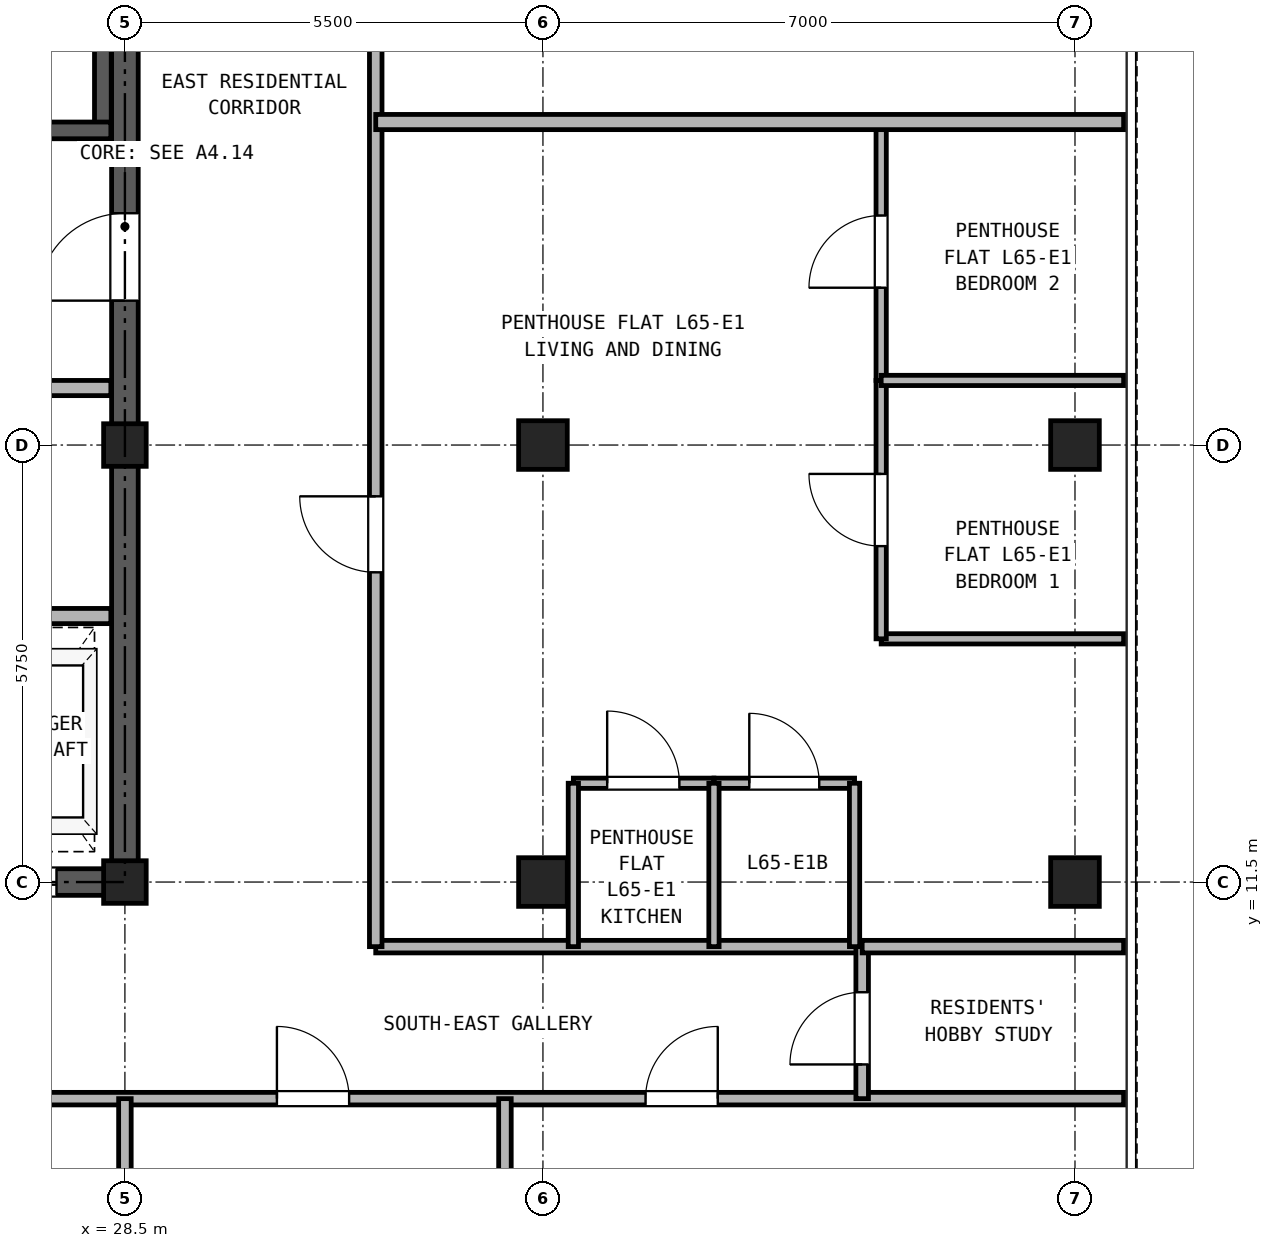
"""IFC4 building model, lengths in metres.
Left out: names, types, materials, properties, quantities, classifications, styles, units other than length and angle.
Written with IfcOpenShell. Run it as: python <this file> out.ifc"""

import sys

from ifc_helpers import new_model, si_unit, direction, frame, frame_2d, origin, origin_2d, place, context, subcontext, project, spatial, rectangle, hollow_rectangle, extrude, source, transform, mapped, element, fill, save


model = new_model("IFC4")
c1 = context("Model", 3, precision=1e-05, world=origin(), true_north=direction((0.0, 1.0)))
c2 = subcontext(c1, "Body", "Model", "MODEL_VIEW")
j1 = project(units=[si_unit("LENGTHUNIT", "METRE"), si_unit("PLANEANGLEUNIT", "RADIAN")], contexts=[c1])
p1 = place(None, origin())
s1 = spatial("IfcSite", under=j1, at=p1, CompositionType="ELEMENT")
p2 = place(p1, origin())
s2 = spatial("IfcBuilding", under=s1, at=p2, CompositionType="ELEMENT")
p3 = place(p2, frame((0.0, 0.0, 229.7)))
s3 = spatial("IfcBuildingStorey", under=s2, at=p3, CompositionType="ELEMENT", Elevation=229.7)
m1 = source(origin(), c2, "Body", "SweptSolid", [
    extrude(hollow_rectangle(XDim=0.64, YDim=0.64, WallThickness=0.035, at=origin_2d()), origin(), (0.0, 0.0, 1.0), 2.98),
])
for number, where, z_axis, x_axis in (
    (1, (41.0, 11.5, 0.0), (0.0, 0.0, 1.0), (1.0, 0.0, 0.0)),
    (2, (41.0, 17.25, 0.0), (0.0, 0.0, 1.0), (1.0, 0.0, 0.0)),
):
    element("IfcColumn", number, at=place(p3, frame(where, z_axis=z_axis, x_axis=x_axis)), inside=s3, PredefinedType="COLUMN", context=c2, shape_type="MappedRepresentation", body=[
        mapped(m1, transform((0.0, 0.0, 0.0), x_axis=(1.0, 0.0, 0.0), y_axis=(0.0, 1.0, 0.0), z_axis=(0.0, 0.0, 1.0), scale=1.0)),
    ])
m2 = source(origin(), c2, "Body", "SweptSolid", [
    extrude(hollow_rectangle(XDim=0.56, YDim=0.56, WallThickness=0.03, at=origin_2d()), origin(), (0.0, 0.0, 1.0), 2.98),
])
for number, where, z_axis, x_axis in (
    (3, (28.5, 11.5, 0.0), (0.0, 0.0, 1.0), (1.0, 0.0, 0.0)),
    (4, (28.5, 17.25, 0.0), (0.0, 0.0, 1.0), (1.0, 0.0, 0.0)),
):
    element("IfcColumn", number, at=place(p3, frame(where, z_axis=z_axis, x_axis=x_axis)), inside=s3, PredefinedType="COLUMN", context=c2, shape_type="MappedRepresentation", body=[
        mapped(m2, transform((0.0, 0.0, 0.0), x_axis=(1.0, 0.0, 0.0), y_axis=(0.0, 1.0, 0.0), z_axis=(0.0, 0.0, 1.0), scale=1.0)),
    ])
for number, where, z_axis, x_axis in (
    (5, (34.0, 11.5, 0.0), (0.0, 0.0, 1.0), (1.0, 0.0, 0.0)),
    (6, (34.0, 17.25, 0.0), (0.0, 0.0, 1.0), (1.0, 0.0, 0.0)),
):
    element("IfcColumn", number, at=place(p3, frame(where, z_axis=z_axis, x_axis=x_axis)), inside=s3, PredefinedType="COLUMN", context=c2, shape_type="MappedRepresentation", body=[
        mapped(m1, transform((0.0, 0.0, 0.0), x_axis=(1.0, 0.0, 0.0), y_axis=(0.0, 1.0, 0.0), z_axis=(0.0, 0.0, 1.0), scale=1.0)),
    ])
p4 = place(p3, frame((18.325, 11.5, 0.0), z_axis=(0.0, 0.0, 1.0), x_axis=(1.0, 0.0, 0.0)))
e7 = element("IfcWall", 7, at=p4, inside=s3, PredefinedType="SHEAR", context=c2, shape_type="SweptSolid", body=[
    extrude(rectangle(XDim=10.35, YDim=0.35, at=frame_2d((5.175, 0.0))), origin(), (0.0, 0.0, 1.0), 2.98),
])
p5 = place(p4, frame((1.775, 0.0, 0.0)))
e8 = element("IfcOpeningElement", 8, at=p5, cuts=e7, PredefinedType="OPENING", context=c2, shape_type="SweptSolid", body=[
    extrude(rectangle(XDim=0.95, YDim=2.15, at=frame_2d((0.475, 1.075))), frame((0.0, 0.185, 0.0), z_axis=(0.0, -1.0, 0.0), x_axis=(1.0, 0.0, 0.0)), (0.0, 0.0, 1.0), 0.37),
])
p6 = place(p4, frame((5.275, 0.0, 0.0)))
e9 = element("IfcOpeningElement", 9, at=p6, cuts=e7, PredefinedType="OPENING", context=c2, shape_type="SweptSolid", body=[
    extrude(rectangle(XDim=0.95, YDim=2.15, at=frame_2d((0.475, 1.075))), frame((0.0, 0.185, 0.0), z_axis=(0.0, -1.0, 0.0), x_axis=(1.0, 0.0, 0.0)), (0.0, 0.0, 1.0), 0.37),
])
p7 = place(p4, frame((8.175, 0.0, 0.0)))
e10 = element("IfcOpeningElement", 10, at=p7, cuts=e7, PredefinedType="OPENING", context=c2, shape_type="SweptSolid", body=[
    extrude(rectangle(XDim=1.1, YDim=2.25, at=frame_2d((0.55, 1.125))), frame((0.0, 0.185, 0.0), z_axis=(0.0, -1.0, 0.0), x_axis=(1.0, 0.0, 0.0)), (0.0, 0.0, 1.0), 0.37),
])
p8 = place(p3, frame((28.5, 11.675, 0.0), z_axis=(0.0, 0.0, 1.0), x_axis=(0.0, 1.0, 0.0)))
e11 = element("IfcWall", 11, at=p8, inside=s3, PredefinedType="SHEAR", context=c2, shape_type="SweptSolid", body=[
    extrude(rectangle(XDim=16.9, YDim=0.35, at=frame_2d((8.45, 0.0))), origin(), (0.0, 0.0, 1.0), 2.98),
])
p9 = place(p8, frame((7.475, 0.0, 0.0)))
e12 = element("IfcOpeningElement", 12, at=p9, cuts=e11, PredefinedType="OPENING", context=c2, shape_type="SweptSolid", body=[
    extrude(rectangle(XDim=1.15, YDim=2.2, at=frame_2d((0.575, 1.1))), frame((0.0, 0.185, 0.0), z_axis=(0.0, -1.0, 0.0), x_axis=(1.0, 0.0, 0.0)), (0.0, 0.0, 1.0), 0.37),
])
p10 = place(p3, frame((28.21, 21.39, 0.0), z_axis=(0.0, 0.0, 1.0), x_axis=(0.0, 1.0, 0.0)))
e13 = element("IfcWall", 13, at=p10, inside=s3, PredefinedType="SOLIDWALL", context=c2, shape_type="SweptSolid", body=[
    extrude(rectangle(XDim=6.945, YDim=0.22, at=frame_2d((3.473, 0.0))), origin(), (0.0, 0.0, 1.0), 2.98),
])
p11 = place(p3, frame((25.13, 21.39, 0.0), z_axis=(0.0, 0.0, 1.0), x_axis=(1.0, 0.0, 0.0)))
e14 = element("IfcWall", 14, at=p11, inside=s3, PredefinedType="SOLIDWALL", context=c2, shape_type="SweptSolid", body=[
    extrude(rectangle(XDim=3.185, YDim=0.22, at=frame_2d((1.593, 0.0))), origin(), (0.0, 0.0, 1.0), 2.98),
])
p12 = place(p11, frame((0.92, 0.0, 0.0)))
e15 = element("IfcOpeningElement", 15, at=p12, cuts=e14, PredefinedType="OPENING", context=c2, shape_type="SweptSolid", body=[
    extrude(rectangle(XDim=1.15, YDim=2.2, at=frame_2d((0.575, 1.1))), frame((0.0, 0.12, 0.0), z_axis=(0.0, -1.0, 0.0), x_axis=(1.0, 0.0, 0.0)), (0.0, 0.0, 1.0), 0.24),
])
p13 = place(p3, frame((18.685, 18.0, 0.0), z_axis=(0.0, 0.0, 1.0), x_axis=(1.0, 0.0, 0.0)))
e16 = element("IfcWall", 16, at=p13, inside=s3, PredefinedType="PARTITIONING", context=c2, shape_type="SweptSolid", body=[
    extrude(rectangle(XDim=9.63, YDim=0.2, at=frame_2d((4.815, 0.0))), origin(), (0.0, 0.0, 1.0), 2.98),
])
p14 = place(p13, frame((0.565, 0.0, 0.0)))
e17 = element("IfcOpeningElement", 17, at=p14, cuts=e16, PredefinedType="OPENING", context=c2, shape_type="SweptSolid", body=[
    extrude(rectangle(XDim=1.3, YDim=2.3, at=frame_2d((0.65, 1.15))), frame((0.0, 0.11, 0.0), z_axis=(0.0, -1.0, 0.0), x_axis=(1.0, 0.0, 0.0)), (0.0, 0.0, 1.0), 0.22),
])
p15 = place(p13, frame((2.665, 0.0, 0.0)))
e18 = element("IfcOpeningElement", 18, at=p15, cuts=e16, PredefinedType="OPENING", context=c2, shape_type="SweptSolid", body=[
    extrude(rectangle(XDim=1.3, YDim=2.3, at=frame_2d((0.65, 1.15))), frame((0.0, 0.11, 0.0), z_axis=(0.0, -1.0, 0.0), x_axis=(1.0, 0.0, 0.0)), (0.0, 0.0, 1.0), 0.22),
])
p16 = place(p13, frame((7.165, 0.0, 0.0)))
e19 = element("IfcOpeningElement", 19, at=p16, cuts=e16, PredefinedType="OPENING", context=c2, shape_type="SweptSolid", body=[
    extrude(rectangle(XDim=1.0, YDim=2.15, at=frame_2d((0.5, 1.075))), frame((0.0, 0.11, 0.0), z_axis=(0.0, -1.0, 0.0), x_axis=(1.0, 0.0, 0.0)), (0.0, 0.0, 1.0), 0.22),
])
p17 = place(p3, frame((18.685, 15.0, 0.0), z_axis=(0.0, 0.0, 1.0), x_axis=(1.0, 0.0, 0.0)))
e20 = element("IfcWall", 20, at=p17, inside=s3, PredefinedType="PARTITIONING", context=c2, shape_type="SweptSolid", body=[
    extrude(rectangle(XDim=9.63, YDim=0.2, at=frame_2d((4.815, 0.0))), origin(), (0.0, 0.0, 1.0), 2.98),
])
p18 = place(p3, frame((5.36, 8.65, 0.0), z_axis=(0.0, 0.0, 1.0), x_axis=(1.0, 0.0, 0.0)))
e21 = element("IfcWall", 21, at=p18, inside=s3, PredefinedType="PARTITIONING", context=c2, shape_type="SweptSolid", body=[
    extrude(rectangle(XDim=36.28, YDim=0.165, at=frame_2d((18.14, 0.0))), origin(), (0.0, 0.0, 1.0), 2.655),
])
p19 = place(p18, frame((8.17, 0.0, 0.0)))
e22 = element("IfcOpeningElement", 22, at=p19, cuts=e21, PredefinedType="OPENING", context=c2, shape_type="SweptSolid", body=[
    extrude(rectangle(XDim=0.95, YDim=2.15, at=frame_2d((0.475, 1.075))), frame((0.0, 0.093, 0.0), z_axis=(0.0, -1.0, 0.0), x_axis=(1.0, 0.0, 0.0)), (0.0, 0.0, 1.0), 0.185),
])
p20 = place(p18, frame((18.14, 0.0, 0.0)))
e23 = element("IfcOpeningElement", 23, at=p20, cuts=e21, PredefinedType="OPENING", context=c2, shape_type="SweptSolid", body=[
    extrude(rectangle(XDim=0.95, YDim=2.15, at=frame_2d((0.475, 1.075))), frame((0.0, 0.093, 0.0), z_axis=(0.0, -1.0, 0.0), x_axis=(1.0, 0.0, 0.0)), (0.0, 0.0, 1.0), 0.185),
])
p21 = place(p18, frame((25.14, 0.0, 0.0)))
e24 = element("IfcOpeningElement", 24, at=p21, cuts=e21, PredefinedType="OPENING", context=c2, shape_type="SweptSolid", body=[
    extrude(rectangle(XDim=0.95, YDim=2.15, at=frame_2d((0.475, 1.075))), frame((0.0, 0.093, 0.0), z_axis=(0.0, -1.0, 0.0), x_axis=(1.0, 0.0, 0.0)), (0.0, 0.0, 1.0), 0.185),
])
p22 = place(p18, frame((29.99, 0.0, 0.0)))
e25 = element("IfcOpeningElement", 25, at=p22, cuts=e21, PredefinedType="OPENING", context=c2, shape_type="SweptSolid", body=[
    extrude(rectangle(XDim=0.95, YDim=2.15, at=frame_2d((0.475, 1.075))), frame((0.0, 0.093, 0.0), z_axis=(0.0, -1.0, 0.0), x_axis=(1.0, 0.0, 0.0)), (0.0, 0.0, 1.0), 0.185),
])
p23 = place(p3, frame((31.8, 10.65, 0.0), z_axis=(0.0, 0.0, 1.0), x_axis=(1.0, 0.0, 0.0)))
e26 = element("IfcWall", 26, at=p23, inside=s3, PredefinedType="PARTITIONING", context=c2, shape_type="SweptSolid", body=[
    extrude(rectangle(XDim=6.4, YDim=0.165, at=frame_2d((3.2, 0.0))), origin(), (0.0, 0.0, 1.0), 2.98),
])
p24 = place(p3, frame((38.2, 8.65, 0.0), z_axis=(0.0, 0.0, 1.0), x_axis=(0.0, 1.0, 0.0)))
e27 = element("IfcWall", 27, at=p24, inside=s3, PredefinedType="PARTITIONING", context=c2, shape_type="SweptSolid", body=[
    extrude(rectangle(XDim=2.0, YDim=0.165, at=frame_2d((1.0, 0.0))), origin(), (0.0, 0.0, 1.0), 2.98),
])
p25 = place(p24, frame((0.45, 0.0, 0.0)))
e28 = element("IfcOpeningElement", 28, at=p25, cuts=e27, PredefinedType="OPENING", context=c2, shape_type="SweptSolid", body=[
    extrude(rectangle(XDim=0.95, YDim=2.15, at=frame_2d((0.475, 1.075))), frame((0.0, 0.093, 0.0), z_axis=(0.0, -1.0, 0.0), x_axis=(1.0, 0.0, 0.0)), (0.0, 0.0, 1.0), 0.185),
])
p26 = place(p3, frame((31.8, 10.65, 0.0), z_axis=(0.0, 0.0, 1.0), x_axis=(0.0, 1.0, 0.0)))
e29 = element("IfcWall", 29, at=p26, inside=s3, PredefinedType="PARTITIONING", context=c2, shape_type="SweptSolid", body=[
    extrude(rectangle(XDim=24.49, YDim=0.165, at=frame_2d((12.245, 0.0))), origin(), (0.0, 0.0, 1.0), 2.98),
])
p27 = place(p26, frame((4.925, 0.0, 0.0)))
e30 = element("IfcOpeningElement", 30, at=p27, cuts=e29, PredefinedType="OPENING", context=c2, shape_type="SweptSolid", body=[
    extrude(rectangle(XDim=1.0, YDim=2.15, at=frame_2d((0.5, 1.075))), frame((0.0, 0.093, 0.0), z_axis=(0.0, -1.0, 0.0), x_axis=(1.0, 0.0, 0.0)), (0.0, 0.0, 1.0), 0.185),
])
p28 = place(p26, frame((15.5, 0.0, 0.0)))
e31 = element("IfcOpeningElement", 31, at=p28, cuts=e29, PredefinedType="OPENING", context=c2, shape_type="SweptSolid", body=[
    extrude(rectangle(XDim=1.0, YDim=2.15, at=frame_2d((0.5, 1.075))), frame((0.0, 0.093, 0.0), z_axis=(0.0, -1.0, 0.0), x_axis=(1.0, 0.0, 0.0)), (0.0, 0.0, 1.0), 0.185),
])
p29 = place(p3, frame((28.5, 0.16, 0.0), z_axis=(0.0, 0.0, 1.0), x_axis=(0.0, 1.0, 0.0)))
e32 = element("IfcWall", 32, at=p29, inside=s3, PredefinedType="PARTITIONING", context=c2, shape_type="SweptSolid", body=[
    extrude(rectangle(XDim=8.49, YDim=0.165, at=frame_2d((4.245, 0.0))), origin(), (0.0, 0.0, 1.0), 2.428),
])
p30 = place(p3, frame((33.5, 0.16, 0.0), z_axis=(0.0, 0.0, 1.0), x_axis=(0.0, 1.0, 0.0)))
e33 = element("IfcWall", 33, at=p30, inside=s3, PredefinedType="PARTITIONING", context=c2, shape_type="SweptSolid", body=[
    extrude(rectangle(XDim=8.49, YDim=0.165, at=frame_2d((4.245, 0.0))), origin(), (0.0, 0.0, 1.0), 2.98),
])
p31 = place(p3, frame((38.2, 10.65, 0.0), z_axis=(0.0, 0.0, 1.0), x_axis=(1.0, 0.0, 0.0)))
e34 = element("IfcWall", 34, at=p31, inside=s3, PredefinedType="PARTITIONING", context=c2, shape_type="SweptSolid", body=[
    extrude(rectangle(XDim=3.44, YDim=0.165, at=frame_2d((1.72, 0.0))), origin(), (0.0, 0.0, 1.0), 2.98),
])
p32 = place(p3, frame((34.4, 12.8, 0.0), z_axis=(0.0, 0.0, 1.0), x_axis=(1.0, 0.0, 0.0)))
e35 = element("IfcWall", 35, at=p32, inside=s3, PredefinedType="PARTITIONING", context=c2, shape_type="SweptSolid", body=[
    extrude(rectangle(XDim=1.85, YDim=0.135, at=frame_2d((0.925, 0.0))), origin(), (0.0, 0.0, 1.0), 2.98),
])
p33 = place(p32, frame((0.445, 0.0, 0.0)))
e36 = element("IfcOpeningElement", 36, at=p33, cuts=e35, PredefinedType="OPENING", context=c2, shape_type="SweptSolid", body=[
    extrude(rectangle(XDim=0.95, YDim=2.15, at=frame_2d((0.475, 1.075))), frame((0.0, 0.077, 0.0), z_axis=(0.0, -1.0, 0.0), x_axis=(1.0, 0.0, 0.0)), (0.0, 0.0, 1.0), 0.155),
])
p34 = place(p3, frame((36.25, 12.8, 0.0), z_axis=(0.0, 0.0, 1.0), x_axis=(1.0, 0.0, 0.0)))
e37 = element("IfcWall", 37, at=p34, inside=s3, PredefinedType="PARTITIONING", context=c2, shape_type="SweptSolid", body=[
    extrude(rectangle(XDim=1.85, YDim=0.135, at=frame_2d((0.925, 0.0))), origin(), (0.0, 0.0, 1.0), 2.98),
])
p35 = place(p34, frame((0.465, 0.0, 0.0)))
e38 = element("IfcOpeningElement", 38, at=p35, cuts=e37, PredefinedType="OPENING", context=c2, shape_type="SweptSolid", body=[
    extrude(rectangle(XDim=0.92, YDim=2.1, at=frame_2d((0.46, 1.05))), frame((0.0, 0.077, 0.0), z_axis=(0.0, -1.0, 0.0), x_axis=(1.0, 0.0, 0.0)), (0.0, 0.0, 1.0), 0.155),
])
for number, where, z_axis, x_axis in (
    (39, (34.4, 10.65, 0.0), (0.0, 0.0, 1.0), (0.0, 1.0, 0.0)),
    (40, (36.25, 10.65, 0.0), (0.0, 0.0, 1.0), (0.0, 1.0, 0.0)),
    (41, (38.1, 10.65, 0.0), (0.0, 0.0, 1.0), (0.0, 1.0, 0.0)),
):
    element("IfcWall", number, at=place(p3, frame(where, z_axis=z_axis, x_axis=x_axis)), inside=s3, PredefinedType="PARTITIONING", context=c2, shape_type="SweptSolid", body=[
        extrude(rectangle(XDim=2.15, YDim=0.135, at=frame_2d((1.075, 0.0))), origin(), (0.0, 0.0, 1.0), 2.98),
    ])
p36 = place(p3, frame((38.45, 14.7, 0.0), z_axis=(0.0, 0.0, 1.0), x_axis=(1.0, 0.0, 0.0)))
e42 = element("IfcWall", 42, at=p36, inside=s3, PredefinedType="PARTITIONING", context=c2, shape_type="SweptSolid", body=[
    extrude(rectangle(XDim=3.19, YDim=0.135, at=frame_2d((1.595, 0.0))), origin(), (0.0, 0.0, 1.0), 2.98),
])
p37 = place(p3, frame((38.45, 14.7, 0.0), z_axis=(0.0, 0.0, 1.0), x_axis=(0.0, 1.0, 0.0)))
e43 = element("IfcWall", 43, at=p37, inside=s3, PredefinedType="PARTITIONING", context=c2, shape_type="SweptSolid", body=[
    extrude(rectangle(XDim=3.4, YDim=0.135, at=frame_2d((1.7, 0.0))), origin(), (0.0, 0.0, 1.0), 2.98),
])
p38 = place(p37, frame((1.22, 0.0, 0.0)))
e44 = element("IfcOpeningElement", 44, at=p38, cuts=e43, PredefinedType="OPENING", context=c2, shape_type="SweptSolid", body=[
    extrude(rectangle(XDim=0.95, YDim=2.15, at=frame_2d((0.475, 1.075))), frame((0.0, 0.077, 0.0), z_axis=(0.0, -1.0, 0.0), x_axis=(1.0, 0.0, 0.0)), (0.0, 0.0, 1.0), 0.155),
])
p39 = place(p3, frame((38.45, 18.1, 0.0), z_axis=(0.0, 0.0, 1.0), x_axis=(0.0, 1.0, 0.0)))
e45 = element("IfcWall", 45, at=p39, inside=s3, PredefinedType="PARTITIONING", context=c2, shape_type="SweptSolid", body=[
    extrude(rectangle(XDim=3.4, YDim=0.135, at=frame_2d((1.7, 0.0))), origin(), (0.0, 0.0, 1.0), 2.98),
])
p40 = place(p39, frame((1.22, 0.0, 0.0)))
e46 = element("IfcOpeningElement", 46, at=p40, cuts=e45, PredefinedType="OPENING", context=c2, shape_type="SweptSolid", body=[
    extrude(rectangle(XDim=0.95, YDim=2.15, at=frame_2d((0.475, 1.075))), frame((0.0, 0.077, 0.0), z_axis=(0.0, -1.0, 0.0), x_axis=(1.0, 0.0, 0.0)), (0.0, 0.0, 1.0), 0.155),
])
p41 = place(p3, frame((38.45, 18.1, 0.0), z_axis=(0.0, 0.0, 1.0), x_axis=(1.0, 0.0, 0.0)))
e47 = element("IfcWall", 47, at=p41, inside=s3, PredefinedType="PARTITIONING", context=c2, shape_type="SweptSolid", body=[
    extrude(rectangle(XDim=3.19, YDim=0.135, at=frame_2d((1.595, 0.0))), origin(), (0.0, 0.0, 1.0), 2.98),
])
p42 = place(p3, frame((31.8, 21.5, 0.0), z_axis=(0.0, 0.0, 1.0), x_axis=(1.0, 0.0, 0.0)))
e48 = element("IfcWall", 48, at=p42, inside=s3, PredefinedType="PARTITIONING", context=c2, shape_type="SweptSolid", body=[
    extrude(rectangle(XDim=9.84, YDim=0.2, at=frame_2d((4.92, 0.0))), origin(), (0.0, 0.0, 1.0), 2.98),
])
p43 = place(p9, origin())
e49 = element("IfcDoor", 49, at=p43, inside=s3, OperationType="SINGLE_SWING_LEFT", PredefinedType="DOOR", context=c2, shape_type="SweptSolid", body=[
    extrude(rectangle(XDim=1.15, YDim=2.2, at=frame_2d((0.575, 1.1))), frame((0.0, 0.025, 0.0), z_axis=(0.0, -1.0, 0.0), x_axis=(1.0, 0.0, 0.0)), (0.0, 0.0, 1.0), 0.05),
])
fill(e12, e49)
p44 = place(p7, frame((1.1, 0.0, 0.0), z_axis=(0.0, 0.0, 1.0), x_axis=(-1.0, 0.0, 0.0)))
e50 = element("IfcDoor", 50, at=p44, inside=s3, OperationType="DOUBLE_DOOR_SLIDING", PredefinedType="DOOR", context=c2, shape_type="SweptSolid", body=[
    extrude(rectangle(XDim=1.1, YDim=2.25, at=frame_2d((0.55, 1.125))), frame((0.0, 0.025, 0.0), z_axis=(0.0, -1.0, 0.0), x_axis=(1.0, 0.0, 0.0)), (0.0, 0.0, 1.0), 0.05),
])
fill(e10, e50)
p45 = place(p21, frame((0.95, 0.0, 0.0), z_axis=(0.0, 0.0, 1.0), x_axis=(-1.0, 0.0, 0.0)))
e51 = element("IfcDoor", 51, at=p45, inside=s3, OperationType="SINGLE_SWING_LEFT", PredefinedType="DOOR", context=c2, shape_type="SweptSolid", body=[
    extrude(rectangle(XDim=0.95, YDim=2.15, at=frame_2d((0.475, 1.075))), frame((0.0, 0.025, 0.0), z_axis=(0.0, -1.0, 0.0), x_axis=(1.0, 0.0, 0.0)), (0.0, 0.0, 1.0), 0.05),
])
fill(e24, e51)
p46 = place(p22, frame((0.95, 0.0, 0.0), z_axis=(0.0, 0.0, 1.0), x_axis=(-1.0, 0.0, 0.0)))
e52 = element("IfcDoor", 52, at=p46, inside=s3, OperationType="SINGLE_SWING_RIGHT", PredefinedType="DOOR", context=c2, shape_type="SweptSolid", body=[
    extrude(rectangle(XDim=0.95, YDim=2.15, at=frame_2d((0.475, 1.075))), frame((0.0, 0.025, 0.0), z_axis=(0.0, -1.0, 0.0), x_axis=(1.0, 0.0, 0.0)), (0.0, 0.0, 1.0), 0.05),
])
fill(e25, e52)
p47 = place(p25, origin())
e53 = element("IfcDoor", 53, at=p47, inside=s3, OperationType="SINGLE_SWING_LEFT", PredefinedType="DOOR", context=c2, shape_type="SweptSolid", body=[
    extrude(rectangle(XDim=0.95, YDim=2.15, at=frame_2d((0.475, 1.075))), frame((0.0, 0.025, 0.0), z_axis=(0.0, -1.0, 0.0), x_axis=(1.0, 0.0, 0.0)), (0.0, 0.0, 1.0), 0.05),
])
fill(e28, e53)
p48 = place(p33, origin())
e54 = element("IfcDoor", 54, at=p48, inside=s3, OperationType="SINGLE_SWING_LEFT", PredefinedType="DOOR", context=c2, shape_type="SweptSolid", body=[
    extrude(rectangle(XDim=0.95, YDim=2.15, at=frame_2d((0.475, 1.075))), frame((0.0, 0.025, 0.0), z_axis=(0.0, -1.0, 0.0), x_axis=(1.0, 0.0, 0.0)), (0.0, 0.0, 1.0), 0.05),
])
fill(e36, e54)
p49 = place(p35, origin())
e55 = element("IfcDoor", 55, at=p49, inside=s3, OperationType="SINGLE_SWING_LEFT", PredefinedType="DOOR", context=c2, shape_type="SweptSolid", body=[
    extrude(rectangle(XDim=0.92, YDim=2.1, at=frame_2d((0.46, 1.05))), frame((0.0, 0.025, 0.0), z_axis=(0.0, -1.0, 0.0), x_axis=(1.0, 0.0, 0.0)), (0.0, 0.0, 1.0), 0.05),
])
fill(e38, e55)
p50 = place(p38, frame((0.95, 0.0, 0.0), z_axis=(0.0, 0.0, 1.0), x_axis=(-1.0, 0.0, 0.0)))
e56 = element("IfcDoor", 56, at=p50, inside=s3, OperationType="SINGLE_SWING_RIGHT", PredefinedType="DOOR", context=c2, shape_type="SweptSolid", body=[
    extrude(rectangle(XDim=0.95, YDim=2.15, at=frame_2d((0.475, 1.075))), frame((0.0, 0.025, 0.0), z_axis=(0.0, -1.0, 0.0), x_axis=(1.0, 0.0, 0.0)), (0.0, 0.0, 1.0), 0.05),
])
fill(e44, e56)
p51 = place(p40, frame((0.95, 0.0, 0.0), z_axis=(0.0, 0.0, 1.0), x_axis=(-1.0, 0.0, 0.0)))
e57 = element("IfcDoor", 57, at=p51, inside=s3, OperationType="SINGLE_SWING_LEFT", PredefinedType="DOOR", context=c2, shape_type="SweptSolid", body=[
    extrude(rectangle(XDim=0.95, YDim=2.15, at=frame_2d((0.475, 1.075))), frame((0.0, 0.025, 0.0), z_axis=(0.0, -1.0, 0.0), x_axis=(1.0, 0.0, 0.0)), (0.0, 0.0, 1.0), 0.05),
])
fill(e46, e57)
p52 = place(p27, frame((1.0, 0.0, 0.0), z_axis=(0.0, 0.0, 1.0), x_axis=(-1.0, 0.0, 0.0)))
e58 = element("IfcDoor", 58, at=p52, inside=s3, OperationType="SINGLE_SWING_RIGHT", PredefinedType="DOOR", context=c2, shape_type="SweptSolid", body=[
    extrude(rectangle(XDim=1.0, YDim=2.15, at=frame_2d((0.5, 1.075))), frame((0.0, 0.025, 0.0), z_axis=(0.0, -1.0, 0.0), x_axis=(1.0, 0.0, 0.0)), (0.0, 0.0, 1.0), 0.05),
])
fill(e30, e58)
save(model, sys.argv[1])
